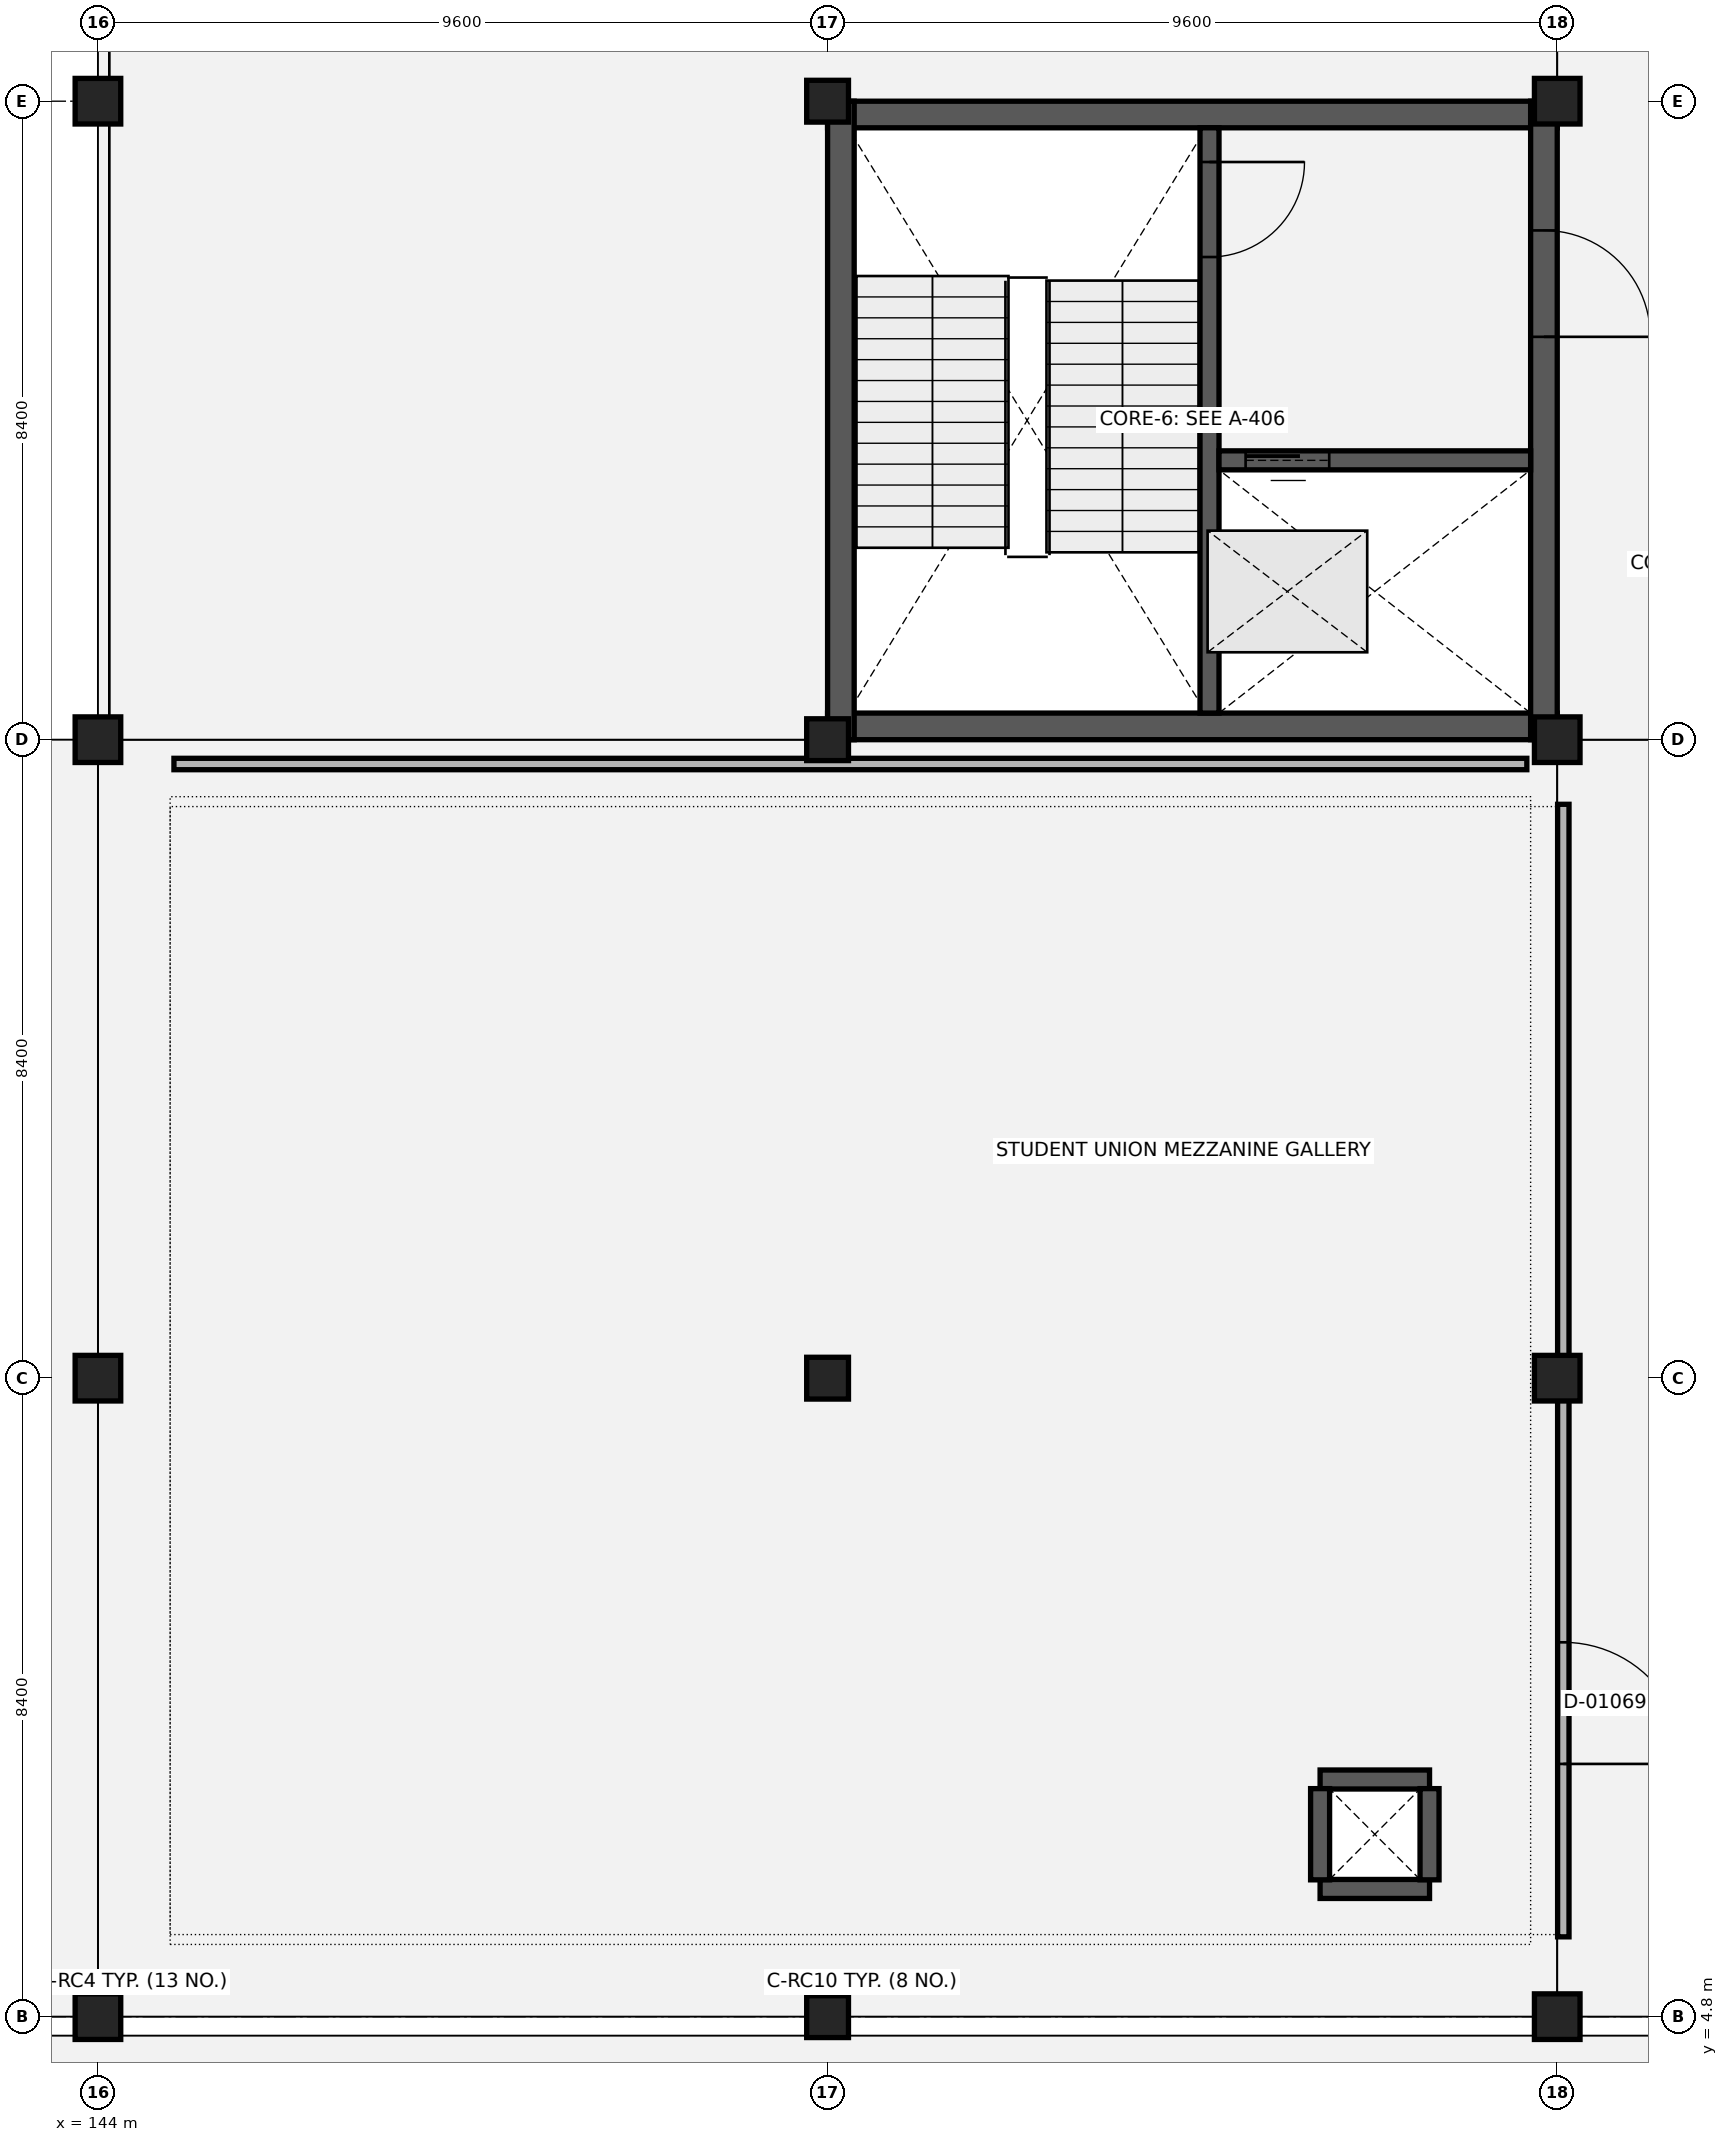
"""IFC4 building model, lengths in metres.
Left out: names, types, materials, properties, quantities, classifications, styles, units other than length and angle.
Written with IfcOpenShell. Run it as: python <this file> out.ifc"""

import sys

from ifc_helpers import new_model, si_unit, direction, frame, frame_2d, origin, origin_2d, place, context, subcontext, project, spatial, rectangle, extrude, element, fill, save


model = new_model("IFC4")
c1 = context("Model", 3, precision=1e-05, world=origin(), true_north=direction((0.0, 1.0)))
c2 = subcontext(c1, "Body", "Model", "MODEL_VIEW")
j1 = project(units=[si_unit("LENGTHUNIT", "METRE"), si_unit("PLANEANGLEUNIT", "RADIAN")], contexts=[c1])
p1 = place(None, origin())
s1 = spatial("IfcSite", under=j1, at=p1, CompositionType="ELEMENT")
p2 = place(p1, origin())
s2 = spatial("IfcBuilding", under=s1, at=p2, CompositionType="ELEMENT")
p3 = place(p2, frame((0.0, 0.0, 5.4)))
s3 = spatial("IfcBuildingStorey", under=s2, at=p3, CompositionType="ELEMENT", Elevation=5.4)
for number, where, z_axis, x_axis in (
    (1, (144.0, 4.8, 0.0), (0.0, 0.0, 1.0), (1.0, 0.0, 0.0)),
    (2, (144.0, 13.2, 0.0), (0.0, 0.0, 1.0), (1.0, 0.0, 0.0)),
    (3, (144.0, 21.6, 0.0), (0.0, 0.0, 1.0), (1.0, 0.0, 0.0)),
    (4, (144.0, 30.0, 0.0), (0.0, 0.0, 1.0), (1.0, 0.0, 0.0)),
):
    element("IfcColumn", number, at=place(p3, frame(where, z_axis=z_axis, x_axis=x_axis)), inside=s3, PredefinedType="COLUMN", context=c2, shape_type="SweptSolid", body=[
        extrude(rectangle(XDim=0.6, YDim=0.6, at=origin_2d()), origin(), (0.0, 0.0, 1.0), 4.8),
    ])
for number, where, z_axis, x_axis in (
    (5, (153.6, 4.8, 0.0), (0.0, 0.0, 1.0), (1.0, 0.0, 0.0)),
    (6, (153.6, 13.2, 0.0), (0.0, 0.0, 1.0), (1.0, 0.0, 0.0)),
    (7, (153.6, 21.6, 0.0), (0.0, 0.0, 1.0), (1.0, 0.0, 0.0)),
    (8, (153.6, 30.0, 0.0), (0.0, 0.0, 1.0), (1.0, 0.0, 0.0)),
):
    element("IfcColumn", number, at=place(p3, frame(where, z_axis=z_axis, x_axis=x_axis)), inside=s3, PredefinedType="COLUMN", context=c2, shape_type="SweptSolid", body=[
        extrude(rectangle(XDim=0.55, YDim=0.55, at=origin_2d()), origin(), (0.0, 0.0, 1.0), 4.8),
    ])
for number, where, z_axis, x_axis in (
    (9, (163.2, 4.8, 0.0), (0.0, 0.0, 1.0), (1.0, 0.0, 0.0)),
    (10, (163.2, 13.2, 0.0), (0.0, 0.0, 1.0), (1.0, 0.0, 0.0)),
    (11, (163.2, 21.6, 0.0), (0.0, 0.0, 1.0), (1.0, 0.0, 0.0)),
    (12, (163.2, 30.0, 0.0), (0.0, 0.0, 1.0), (1.0, 0.0, 0.0)),
):
    element("IfcColumn", number, at=place(p3, frame(where, z_axis=z_axis, x_axis=x_axis)), inside=s3, PredefinedType="COLUMN", context=c2, shape_type="SweptSolid", body=[
        extrude(rectangle(XDim=0.6, YDim=0.6, at=origin_2d()), origin(), (0.0, 0.0, 1.0), 4.8),
    ])
for number, where, z_axis, x_axis in (
    (13, (160.08, 6.48, 0.0), (0.0, 0.0, 1.0), (1.0, 0.0, 0.0)),
    (14, (160.08, 7.92, 0.0), (0.0, 0.0, 1.0), (1.0, 0.0, 0.0)),
):
    element("IfcWall", number, at=place(p3, frame(where, z_axis=z_axis, x_axis=x_axis)), inside=s3, PredefinedType="SHEAR", context=c2, shape_type="SweptSolid", body=[
        extrude(rectangle(XDim=1.44, YDim=0.25, at=frame_2d((0.72, 0.0))), origin(), (0.0, 0.0, 1.0), 3.6),
    ])
for number, where, z_axis, x_axis in (
    (15, (160.08, 6.6, 0.0), (0.0, 0.0, 1.0), (0.0, 1.0, 0.0)),
    (16, (161.52, 6.6, 0.0), (0.0, 0.0, 1.0), (0.0, 1.0, 0.0)),
):
    element("IfcWall", number, at=place(p3, frame(where, z_axis=z_axis, x_axis=x_axis)), inside=s3, PredefinedType="SHEAR", context=c2, shape_type="SweptSolid", body=[
        extrude(rectangle(XDim=1.2, YDim=0.25, at=frame_2d((0.6, 0.0))), origin(), (0.0, 0.0, 1.0), 3.6),
    ])
for number, where, z_axis, x_axis in (
    (17, (153.6, 29.825, 0.0), (0.0, 0.0, 1.0), (1.0, 0.0, 0.0)),
    (18, (153.6, 21.775, 0.0), (0.0, 0.0, 1.0), (1.0, 0.0, 0.0)),
):
    element("IfcWall", number, at=place(p3, frame(where, z_axis=z_axis, x_axis=x_axis)), inside=s3, PredefinedType="SHEAR", context=c2, shape_type="SweptSolid", body=[
        extrude(rectangle(XDim=9.6, YDim=0.35, at=frame_2d((4.8, 0.0))), origin(), (0.0, 0.0, 1.0), 4.48),
    ])
p4 = place(p3, frame((153.775, 21.6, 0.0), z_axis=(0.0, 0.0, 1.0), x_axis=(0.0, 1.0, 0.0)))
e19 = element("IfcWall", 19, at=p4, inside=s3, PredefinedType="SHEAR", context=c2, shape_type="SweptSolid", body=[
    extrude(rectangle(XDim=8.4, YDim=0.35, at=frame_2d((4.2, 0.0))), origin(), (0.0, 0.0, 1.0), 4.48),
])
p5 = place(p3, frame((163.025, 21.6, 0.0), z_axis=(0.0, 0.0, 1.0), x_axis=(0.0, 1.0, 0.0)))
e20 = element("IfcWall", 20, at=p5, inside=s3, PredefinedType="SHEAR", context=c2, shape_type="SweptSolid", body=[
    extrude(rectangle(XDim=8.4, YDim=0.35, at=frame_2d((4.2, 0.0))), origin(), (0.0, 0.0, 1.0), 4.48),
])
p6 = place(p5, frame((5.3, 0.0, 0.0)))
e21 = element("IfcOpeningElement", 21, at=p6, cuts=e20, PredefinedType="OPENING", context=c2, shape_type="SweptSolid", body=[
    extrude(rectangle(XDim=1.4, YDim=2.15, at=frame_2d((0.7, 1.075))), frame((0.0, 0.185, 0.0), z_axis=(0.0, -1.0, 0.0), x_axis=(1.0, 0.0, 0.0)), (0.0, 0.0, 1.0), 0.37),
])
p7 = place(p3, frame((158.625, 29.65, 0.0), z_axis=(0.0, 0.0, 1.0), x_axis=(0.0, -1.0, 0.0)))
e22 = element("IfcWall", 22, at=p7, inside=s3, PredefinedType="SHEAR", context=c2, shape_type="SweptSolid", body=[
    extrude(rectangle(XDim=7.7, YDim=0.25, at=frame_2d((3.85, 0.0))), origin(), (0.0, 0.0, 1.0), 4.48),
])
p8 = place(p7, frame((0.45, 0.0, 0.0)))
e23 = element("IfcOpeningElement", 23, at=p8, cuts=e22, PredefinedType="OPENING", context=c2, shape_type="SweptSolid", body=[
    extrude(rectangle(XDim=1.25, YDim=2.15, at=frame_2d((0.625, 1.075))), frame((0.0, 0.135, 0.0), z_axis=(0.0, -1.0, 0.0), x_axis=(1.0, 0.0, 0.0)), (0.0, 0.0, 1.0), 0.27),
])
p9 = place(p3, frame((158.75, 25.275, 0.0), z_axis=(0.0, 0.0, 1.0), x_axis=(1.0, 0.0, 0.0)))
e24 = element("IfcWall", 24, at=p9, inside=s3, PredefinedType="SHEAR", context=c2, shape_type="SweptSolid", body=[
    extrude(rectangle(XDim=4.1, YDim=0.25, at=frame_2d((2.05, 0.0))), origin(), (0.0, 0.0, 1.0), 4.48),
])
p10 = place(p9, frame((0.35, 0.0, 0.0)))
e25 = element("IfcOpeningElement", 25, at=p10, cuts=e24, PredefinedType="OPENING", context=c2, shape_type="SweptSolid", body=[
    extrude(rectangle(XDim=1.1, YDim=2.15, at=frame_2d((0.55, 1.075))), frame((0.0, 0.135, 0.0), z_axis=(0.0, -1.0, 0.0), x_axis=(1.0, 0.0, 0.0)), (0.0, 0.0, 1.0), 0.27),
])
p11 = place(p3, frame((163.28, 5.85, 0.0), z_axis=(0.0, 0.0, 1.0), x_axis=(0.0, 1.0, 0.0)))
e26 = element("IfcWall", 26, at=p11, inside=s3, PredefinedType="PARTITIONING", context=c2, shape_type="SweptSolid", body=[
    extrude(rectangle(XDim=14.9, YDim=0.15, at=frame_2d((7.45, 0.0))), origin(), (0.0, 0.0, 1.0), 3.26),
])
p12 = place(p11, frame((2.275, 0.0, 0.0)))
e27 = element("IfcOpeningElement", 27, at=p12, cuts=e26, PredefinedType="OPENING", context=c2, shape_type="SweptSolid", body=[
    extrude(rectangle(XDim=1.6, YDim=2.15, at=frame_2d((0.8, 1.075))), frame((0.0, 0.085, 0.0), z_axis=(0.0, -1.0, 0.0), x_axis=(1.0, 0.0, 0.0)), (0.0, 0.0, 1.0), 0.17),
])
p13 = place(p3, frame((145.0, 21.28, 0.0), z_axis=(0.0, 0.0, 1.0), x_axis=(1.0, 0.0, 0.0)))
e28 = element("IfcWall", 28, at=p13, inside=s3, PredefinedType="PARTITIONING", context=c2, shape_type="SweptSolid", body=[
    extrude(rectangle(XDim=17.8, YDim=0.15, at=frame_2d((8.9, 0.0))), origin(), (0.0, 0.0, 1.0), 3.26),
])
p14 = place(p8, origin())
e29 = element("IfcDoor", 29, at=p14, inside=s3, OperationType="SINGLE_SWING_LEFT", PredefinedType="DOOR", context=c2, shape_type="SweptSolid", body=[
    extrude(rectangle(XDim=1.25, YDim=2.15, at=frame_2d((0.625, 1.075))), frame((0.0, 0.025, 0.0), z_axis=(0.0, -1.0, 0.0), x_axis=(1.0, 0.0, 0.0)), (0.0, 0.0, 1.0), 0.05),
])
fill(e23, e29)
p15 = place(p10, origin())
e30 = element("IfcDoor", 30, at=p15, inside=s3, OperationType="SLIDING_TO_LEFT", PredefinedType="DOOR", context=c2, shape_type="SweptSolid", body=[
    extrude(rectangle(XDim=1.1, YDim=2.15, at=frame_2d((0.55, 1.075))), frame((0.0, 0.025, 0.0), z_axis=(0.0, -1.0, 0.0), x_axis=(1.0, 0.0, 0.0)), (0.0, 0.0, 1.0), 0.05),
])
fill(e25, e30)
p16 = place(p6, origin())
e31 = element("IfcDoor", 31, at=p16, inside=s3, OperationType="SINGLE_SWING_RIGHT", PredefinedType="DOOR", context=c2, shape_type="SweptSolid", body=[
    extrude(rectangle(XDim=1.4, YDim=2.15, at=frame_2d((0.7, 1.075))), frame((0.0, 0.025, 0.0), z_axis=(0.0, -1.0, 0.0), x_axis=(1.0, 0.0, 0.0)), (0.0, 0.0, 1.0), 0.05),
])
fill(e21, e31)
p17 = place(p12, origin())
e32 = element("IfcDoor", 32, at=p17, inside=s3, OperationType="SINGLE_SWING_RIGHT", PredefinedType="DOOR", context=c2, shape_type="SweptSolid", body=[
    extrude(rectangle(XDim=1.6, YDim=2.15, at=frame_2d((0.8, 1.075))), frame((0.0, 0.025, 0.0), z_axis=(0.0, -1.0, 0.0), x_axis=(1.0, 0.0, 0.0)), (0.0, 0.0, 1.0), 0.05),
])
fill(e27, e32)
save(model, sys.argv[1])
